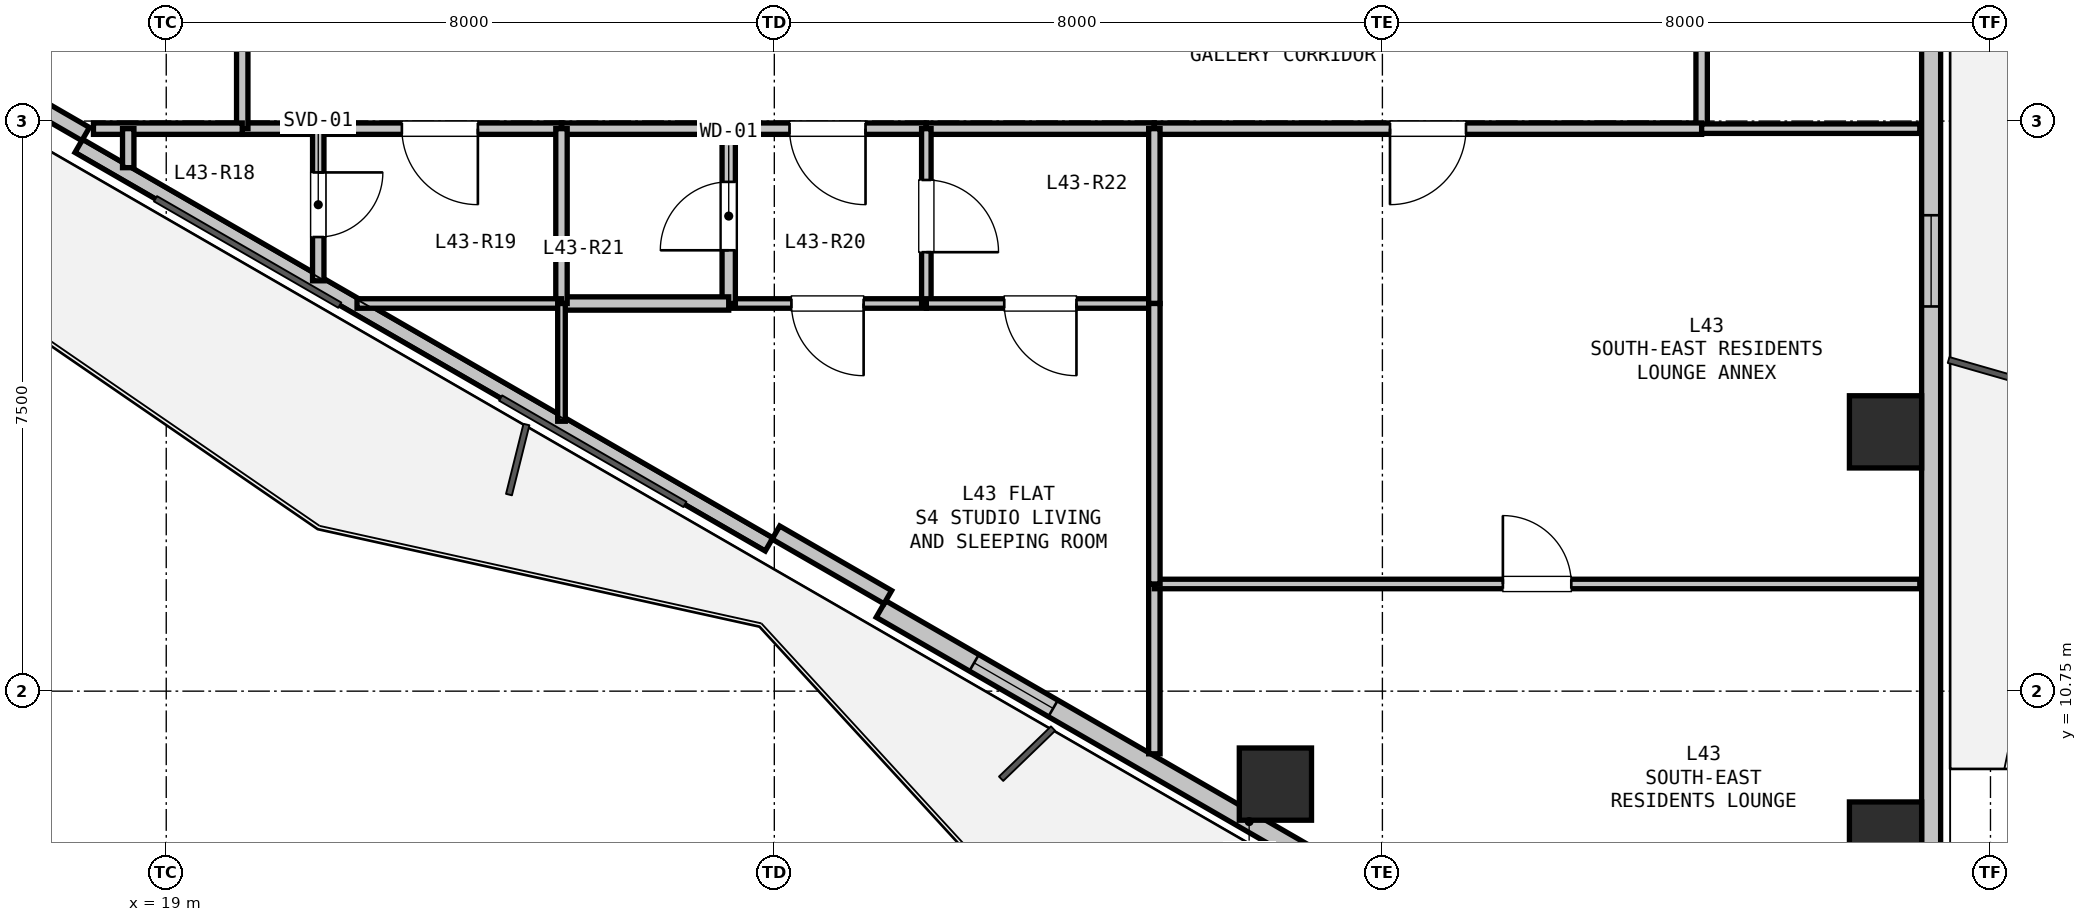
"""IFC4 building model, lengths in metres.
Left out: names, types, materials, properties, quantities, classifications, styles, units other than length and angle.
Written with IfcOpenShell. Run it as: python <this file> out.ifc"""

import sys

from ifc_helpers import new_model, si_unit, direction, frame, frame_2d, origin, origin_2d, place, context, subcontext, project, spatial, rectangle, hollow_rectangle, extrude, element, fill, save


model = new_model("IFC4")
c1 = context("Model", 3, precision=1e-05, world=origin(), true_north=direction((0.0, 1.0)))
c2 = subcontext(c1, "Body", "Model", "MODEL_VIEW")
j1 = project(units=[si_unit("LENGTHUNIT", "METRE"), si_unit("PLANEANGLEUNIT", "RADIAN")], contexts=[c1])
p1 = place(None, origin())
s1 = spatial("IfcSite", under=j1, at=p1, CompositionType="ELEMENT")
p2 = place(p1, origin())
s2 = spatial("IfcBuilding", under=s1, at=p2, CompositionType="ELEMENT")
p3 = place(p2, frame((0.0, 0.0, 154.2)))
s3 = spatial("IfcBuildingStorey", under=s2, at=p3, CompositionType="ELEMENT", Elevation=154.2)
for number, where, z_axis, x_axis in (
    (1, (41.619, 14.161, 0.0), (0.0, 0.0, 1.0), (1.0, 0.0, 0.0)),
    (2, (41.619, 8.817, 0.0), (0.0, 0.0, 1.0), (1.0, 0.0, 0.0)),
    (3, (33.593, 9.527, 0.0), (0.0, 0.0, 1.0), (1.0, 0.0, 0.0)),
):
    element("IfcColumn", number, at=place(p3, frame(where, z_axis=z_axis, x_axis=x_axis)), inside=s3, PredefinedType="COLUMN", context=c2, shape_type="SweptSolid", body=[
        extrude(hollow_rectangle(XDim=0.95, YDim=0.95, WallThickness=0.028, at=origin_2d()), origin(), (0.0, 0.0, 1.0), 3.3),
    ])
p4 = place(p3, frame((42.219, 19.807, 0.0), z_axis=(0.0, 0.0, 1.0), x_axis=(0.0, -1.0, 0.0)))
e4 = element("IfcWall", 4, at=p4, inside=s3, PredefinedType="SOLIDWALL", context=c2, shape_type="SweptSolid", body=[
    extrude(rectangle(XDim=11.186, YDim=0.25, at=frame_2d((5.593, 0.0))), origin(), (0.0, 0.0, 1.0), 2.68),
])
p5 = place(p4, frame((2.796, 0.0, 0.9)))
e5 = element("IfcOpeningElement", 5, at=p5, cuts=e4, PredefinedType="OPENING", context=c2, shape_type="SweptSolid", body=[
    extrude(rectangle(XDim=1.2, YDim=1.5, at=frame_2d((0.6, 0.75))), frame((0.0, 0.135, 0.0), z_axis=(0.0, -1.0, 0.0), x_axis=(1.0, 0.0, 0.0)), (0.0, 0.0, 1.0), 0.27),
])
p6 = place(p3, frame((38.091, 6.237, 0.0), z_axis=(0.0, 0.0, 1.0), x_axis=(-0.86602239209, 0.500005216371, 0.0)))
e6 = element("IfcWall", 6, at=p6, inside=s3, PredefinedType="SOLIDWALL", context=c2, shape_type="SweptSolid", body=[
    extrude(rectangle(XDim=11.186, YDim=0.25, at=frame_2d((5.593, 0.0))), origin(), (0.0, 0.0, 1.0), 2.68),
])
p7 = place(p6, frame((2.027, 0.0, 0.0)))
e7 = element("IfcOpeningElement", 7, at=p7, cuts=e6, PredefinedType="OPENING", context=c2, shape_type="SweptSolid", body=[
    extrude(rectangle(XDim=1.1, YDim=2.1, at=frame_2d((0.55, 1.05))), frame((0.0, 0.135, 0.0), z_axis=(0.0, -1.0, 0.0), x_axis=(1.0, 0.0, 0.0)), (0.0, 0.0, 1.0), 0.27),
])
p8 = place(p6, frame((8.571, 0.0, 0.9)))
e8 = element("IfcOpeningElement", 8, at=p8, cuts=e6, PredefinedType="OPENING", context=c2, shape_type="SweptSolid", body=[
    extrude(rectangle(XDim=1.2, YDim=1.4, at=frame_2d((0.6, 0.7))), frame((0.0, 0.135, 0.0), z_axis=(0.0, -1.0, 0.0), x_axis=(1.0, 0.0, 0.0)), (0.0, 0.0, 1.0), 0.27),
])
p9 = place(p3, frame((26.931, 12.68, 0.0), z_axis=(0.0, 0.0, 1.0), x_axis=(-0.866026619769, 0.499997893847, 0.0)))
e9 = element("IfcWall", 9, at=p9, inside=s3, PredefinedType="PARAPET", context=c2, shape_type="SweptSolid", body=[
    extrude(rectangle(XDim=10.486, YDim=0.2, at=frame_2d((5.243, 0.0))), origin(), (0.0, 0.0, 1.0), 0.2),
])
for number, where, z_axis, x_axis in (
    (10, (28.493, 11.986, 0.0), (0.0, 0.0, 1.0), (-0.866, 0.5, 0.0)),
    (11, (17.94, 18.079, 0.0), (0.0, 0.0, 1.0), (-0.866, 0.5, 0.0)),
):
    element("IfcWall", number, at=place(p3, frame(where, z_axis=z_axis, x_axis=x_axis)), inside=s3, PredefinedType="PARAPET", context=c2, shape_type="SweptSolid", body=[
        extrude(rectangle(XDim=1.7, YDim=0.2, at=frame_2d((0.85, 0.0))), origin(), (0.0, 0.0, 1.0), 2.68),
    ])
p10 = place(p3, frame((39.2, 19.9, 0.0), z_axis=(0.0, 0.0, 1.0), x_axis=(0.0, -1.0, 0.0)))
e12 = element("IfcWall", 12, at=p10, inside=s3, PredefinedType="PARTITIONING", context=c2, shape_type="SweptSolid", body=[
    extrude(rectangle(XDim=1.75, YDim=0.15, at=frame_2d((0.875, 0.0))), origin(), (0.0, 0.0, 1.0), 3.06),
])
p11 = place(p3, frame((39.2, 18.15, 0.0), z_axis=(0.0, 0.0, 1.0), x_axis=(-1.0, 0.0, 0.0)))
e13 = element("IfcWall", 13, at=p11, inside=s3, PredefinedType="PARTITIONING", context=c2, shape_type="SweptSolid", body=[
    extrude(rectangle(XDim=7.2, YDim=0.15, at=frame_2d((3.6, 0.0))), origin(), (0.0, 0.0, 1.0), 2.433),
])
p12 = place(p11, frame((3.1, 0.0, 0.0)))
e14 = element("IfcOpeningElement", 14, at=p12, cuts=e13, PredefinedType="OPENING", context=c2, shape_type="SweptSolid", body=[
    extrude(rectangle(XDim=1.0, YDim=2.15, at=frame_2d((0.5, 1.075))), frame((0.0, 0.085, 0.0), z_axis=(0.0, -1.0, 0.0), x_axis=(1.0, 0.0, 0.0)), (0.0, 0.0, 1.0), 0.17),
])
p13 = place(p3, frame((32.0, 18.15, 0.0), z_axis=(0.0, 0.0, 1.0), x_axis=(-1.0, 0.0, 0.0)))
e15 = element("IfcWall", 15, at=p13, inside=s3, PredefinedType="PARTITIONING", context=c2, shape_type="SweptSolid", body=[
    extrude(rectangle(XDim=3.0, YDim=0.15, at=frame_2d((1.5, 0.0))), origin(), (0.0, 0.0, 1.0), 3.06),
])
p14 = place(p3, frame((29.0, 18.15, 0.0), z_axis=(0.0, 0.0, 1.0), x_axis=(-1.0, 0.0, 0.0)))
e16 = element("IfcWall", 16, at=p14, inside=s3, PredefinedType="PARTITIONING", context=c2, shape_type="SweptSolid", body=[
    extrude(rectangle(XDim=2.6, YDim=0.15, at=frame_2d((1.3, 0.0))), origin(), (0.0, 0.0, 1.0), 3.06),
])
p15 = place(p14, frame((0.8, 0.0, 0.0)))
e17 = element("IfcOpeningElement", 17, at=p15, cuts=e16, PredefinedType="OPENING", context=c2, shape_type="SweptSolid", body=[
    extrude(rectangle(XDim=1.0, YDim=2.15, at=frame_2d((0.5, 1.075))), frame((0.0, 0.085, 0.0), z_axis=(0.0, -1.0, 0.0), x_axis=(1.0, 0.0, 0.0)), (0.0, 0.0, 1.0), 0.17),
])
p16 = place(p3, frame((26.4, 18.15, 0.0), z_axis=(0.0, 0.0, 1.0), x_axis=(-1.0, 0.0, 0.0)))
e18 = element("IfcWall", 18, at=p16, inside=s3, PredefinedType="PARTITIONING", context=c2, shape_type="SweptSolid", body=[
    extrude(rectangle(XDim=2.2, YDim=0.15, at=frame_2d((1.1, 0.0))), origin(), (0.0, 0.0, 1.0), 2.433),
])
p17 = place(p3, frame((24.2, 18.15, 0.0), z_axis=(0.0, 0.0, 1.0), x_axis=(-1.0, 0.0, 0.0)))
e19 = element("IfcWall", 19, at=p17, inside=s3, PredefinedType="PARTITIONING", context=c2, shape_type="SweptSolid", body=[
    extrude(rectangle(XDim=3.2, YDim=0.15, at=frame_2d((1.6, 0.0))), origin(), (0.0, 0.0, 1.0), 2.433),
])
p18 = place(p17, frame((1.1, 0.0, 0.0)))
e20 = element("IfcOpeningElement", 20, at=p18, cuts=e19, PredefinedType="OPENING", context=c2, shape_type="SweptSolid", body=[
    extrude(rectangle(XDim=1.0, YDim=2.15, at=frame_2d((0.5, 1.075))), frame((0.0, 0.085, 0.0), z_axis=(0.0, -1.0, 0.0), x_axis=(1.0, 0.0, 0.0)), (0.0, 0.0, 1.0), 0.17),
])
p19 = place(p3, frame((21.0, 18.15, 0.0), z_axis=(0.0, 0.0, 1.0), x_axis=(-1.0, 0.0, 0.0)))
e21 = element("IfcWall", 21, at=p19, inside=s3, PredefinedType="PARTITIONING", context=c2, shape_type="SweptSolid", body=[
    extrude(rectangle(XDim=1.0, YDim=0.15, at=frame_2d((0.5, 0.0))), origin(), (0.0, 0.0, 1.0), 3.06),
])
p20 = place(p3, frame((20.0, 18.15, 0.0), z_axis=(0.0, 0.0, 1.0), x_axis=(0.0, 1.0, 0.0)))
e22 = element("IfcWall", 22, at=p20, inside=s3, PredefinedType="PARTITIONING", context=c2, shape_type="SweptSolid", body=[
    extrude(rectangle(XDim=1.75, YDim=0.15, at=frame_2d((0.875, 0.0))), origin(), (0.0, 0.0, 1.0), 3.06),
])
p21 = place(p3, frame((29.0, 15.85, 0.0), z_axis=(0.0, 0.0, 1.0), x_axis=(-1.0, 0.0, 0.0)))
e23 = element("IfcWall", 23, at=p21, inside=s3, PredefinedType="PARTITIONING", context=c2, shape_type="SweptSolid", body=[
    extrude(rectangle(XDim=2.6, YDim=0.125, at=frame_2d((1.3, 0.0))), origin(), (0.0, 0.0, 1.0), 2.433),
])
p22 = place(p21, frame((0.825, 0.0, 0.0)))
e24 = element("IfcOpeningElement", 24, at=p22, cuts=e23, PredefinedType="OPENING", context=c2, shape_type="SweptSolid", body=[
    extrude(rectangle(XDim=0.95, YDim=2.1, at=frame_2d((0.475, 1.05))), frame((0.0, 0.073, 0.0), z_axis=(0.0, -1.0, 0.0), x_axis=(1.0, 0.0, 0.0)), (0.0, 0.0, 1.0), 0.145),
])
p23 = place(p3, frame((26.4, 15.85, 0.0), z_axis=(0.0, 0.0, 1.0), x_axis=(0.0, 1.0, 0.0)))
e25 = element("IfcWall", 25, at=p23, inside=s3, PredefinedType="PLUMBINGWALL", context=c2, shape_type="SweptSolid", body=[
    extrude(rectangle(XDim=2.3, YDim=0.175, at=frame_2d((1.15, 0.0))), origin(), (0.0, 0.0, 1.0), 2.433),
])
p24 = place(p23, frame((0.7, 0.0, 0.0)))
e26 = element("IfcOpeningElement", 26, at=p24, cuts=e25, PredefinedType="OPENING", context=c2, shape_type="SweptSolid", body=[
    extrude(rectangle(XDim=0.9, YDim=2.1, at=frame_2d((0.45, 1.05))), frame((0.0, 0.097, 0.0), z_axis=(0.0, -1.0, 0.0), x_axis=(1.0, 0.0, 0.0)), (0.0, 0.0, 1.0), 0.195),
])
p25 = place(p3, frame((29.0, 18.15, 0.0), z_axis=(0.0, 0.0, 1.0), x_axis=(0.0, -1.0, 0.0)))
e27 = element("IfcWall", 27, at=p25, inside=s3, PredefinedType="PARTITIONING", context=c2, shape_type="SweptSolid", body=[
    extrude(rectangle(XDim=2.3, YDim=0.125, at=frame_2d((1.15, 0.0))), origin(), (0.0, 0.0, 1.0), 3.06),
])
p26 = place(p25, frame((0.675, 0.0, 0.0)))
e28 = element("IfcOpeningElement", 28, at=p26, cuts=e27, PredefinedType="OPENING", context=c2, shape_type="SweptSolid", body=[
    extrude(rectangle(XDim=0.95, YDim=2.1, at=frame_2d((0.475, 1.05))), frame((0.0, 0.073, 0.0), z_axis=(0.0, -1.0, 0.0), x_axis=(1.0, 0.0, 0.0)), (0.0, 0.0, 1.0), 0.145),
])
p27 = place(p3, frame((26.4, 15.85, 0.0), z_axis=(0.0, 0.0, 1.0), x_axis=(-1.0, 0.0, 0.0)))
e29 = element("IfcWall", 29, at=p27, inside=s3, PredefinedType="PLUMBINGWALL", context=c2, shape_type="SweptSolid", body=[
    extrude(rectangle(XDim=2.2, YDim=0.175, at=frame_2d((1.1, 0.0))), origin(), (0.0, 0.0, 1.0), 3.06),
])
p28 = place(p3, frame((24.2, 15.85, 0.0), z_axis=(0.0, 0.0, 1.0), x_axis=(0.0, 1.0, 0.0)))
e30 = element("IfcWall", 30, at=p28, inside=s3, PredefinedType="PARTITIONING", context=c2, shape_type="SweptSolid", body=[
    extrude(rectangle(XDim=2.3, YDim=0.15, at=frame_2d((1.15, 0.0))), origin(), (0.0, 0.0, 1.0), 2.433),
])
p29 = place(p3, frame((32.0, 15.85, 0.0), z_axis=(0.0, 0.0, 1.0), x_axis=(-1.0, 0.0, 0.0)))
e31 = element("IfcWall", 31, at=p29, inside=s3, PredefinedType="PARTITIONING", context=c2, shape_type="SweptSolid", body=[
    extrude(rectangle(XDim=3.0, YDim=0.125, at=frame_2d((1.5, 0.0))), origin(), (0.0, 0.0, 1.0), 3.06),
])
p30 = place(p29, frame((1.025, 0.0, 0.0)))
e32 = element("IfcOpeningElement", 32, at=p30, cuts=e31, PredefinedType="OPENING", context=c2, shape_type="SweptSolid", body=[
    extrude(rectangle(XDim=0.95, YDim=2.1, at=frame_2d((0.475, 1.05))), frame((0.0, 0.073, 0.0), z_axis=(0.0, -1.0, 0.0), x_axis=(1.0, 0.0, 0.0)), (0.0, 0.0, 1.0), 0.145),
])
p31 = place(p3, frame((32.0, 18.15, 0.0), z_axis=(0.0, 0.0, 1.0), x_axis=(0.0, -1.0, 0.0)))
e33 = element("IfcWall", 33, at=p31, inside=s3, PredefinedType="PARTITIONING", context=c2, shape_type="SweptSolid", body=[
    extrude(rectangle(XDim=2.3, YDim=0.15, at=frame_2d((1.15, 0.0))), origin(), (0.0, 0.0, 1.0), 3.06),
])
p32 = place(p3, frame((32.0, 9.926, 0.0), z_axis=(0.0, 0.0, 1.0), x_axis=(0.0, 1.0, 0.0)))
e34 = element("IfcWall", 34, at=p32, inside=s3, PredefinedType="PARTITIONING", context=c2, shape_type="SweptSolid", body=[
    extrude(rectangle(XDim=2.234, YDim=0.15, at=frame_2d((1.117, 0.0))), origin(), (0.0, 0.0, 1.0), 2.365),
])
p33 = place(p3, frame((32.0, 12.16, 0.0), z_axis=(0.0, 0.0, 1.0), x_axis=(1.0, 0.0, 0.0)))
e35 = element("IfcWall", 35, at=p33, inside=s3, PredefinedType="PARTITIONING", context=c2, shape_type="SweptSolid", body=[
    extrude(rectangle(XDim=10.07, YDim=0.125, at=frame_2d((5.035, 0.0))), origin(), (0.0, 0.0, 1.0), 2.433),
])
p34 = place(p33, frame((4.585, 0.0, 0.0)))
e36 = element("IfcOpeningElement", 36, at=p34, cuts=e35, PredefinedType="OPENING", context=c2, shape_type="SweptSolid", body=[
    extrude(rectangle(XDim=0.9, YDim=2.1, at=frame_2d((0.45, 1.05))), frame((0.0, 0.073, 0.0), z_axis=(0.0, -1.0, 0.0), x_axis=(1.0, 0.0, 0.0)), (0.0, 0.0, 1.0), 0.145),
])
p35 = place(p3, frame((39.2, 18.15, 0.0), z_axis=(0.0, 0.0, 1.0), x_axis=(1.0, 0.0, 0.0)))
e37 = element("IfcWall", 37, at=p35, inside=s3, PredefinedType="PARTITIONING", context=c2, shape_type="SweptSolid", body=[
    extrude(rectangle(XDim=2.87, YDim=0.125, at=frame_2d((1.435, 0.0))), origin(), (0.0, 0.0, 1.0), 2.365),
])
p36 = place(p3, frame((32.0, 12.16, 0.0), z_axis=(0.0, 0.0, 1.0), x_axis=(0.0, 1.0, 0.0)))
e38 = element("IfcWall", 38, at=p36, inside=s3, PredefinedType="PARTITIONING", context=c2, shape_type="SweptSolid", body=[
    extrude(rectangle(XDim=3.69, YDim=0.15, at=frame_2d((1.845, 0.0))), origin(), (0.0, 0.0, 1.0), 3.06),
])
p37 = place(p3, frame((18.042, 18.15, 0.0), z_axis=(0.0, 0.0, 1.0), x_axis=(1.0, 0.0, 0.0)))
e39 = element("IfcWall", 39, at=p37, inside=s3, PredefinedType="PARTITIONING", context=c2, shape_type="SweptSolid", body=[
    extrude(rectangle(XDim=1.958, YDim=0.15, at=frame_2d((0.979, 0.0))), origin(), (0.0, 0.0, 1.0), 2.365),
])
p38 = place(p3, frame((21.0, 18.15, 0.0), z_axis=(0.0, 0.0, 1.0), x_axis=(0.0, -1.0, 0.0)))
e40 = element("IfcWall", 40, at=p38, inside=s3, PredefinedType="PARTITIONING", context=c2, shape_type="SweptSolid", body=[
    extrude(rectangle(XDim=2.001, YDim=0.15, at=frame_2d((1.001, 0.0))), origin(), (0.0, 0.0, 1.0), 2.365),
])
p39 = place(p38, frame((0.576, 0.0, 0.0)))
e41 = element("IfcOpeningElement", 41, at=p39, cuts=e40, PredefinedType="OPENING", context=c2, shape_type="SweptSolid", body=[
    extrude(rectangle(XDim=0.85, YDim=2.1, at=frame_2d((0.425, 1.05))), frame((0.0, 0.085, 0.0), z_axis=(0.0, -1.0, 0.0), x_axis=(1.0, 0.0, 0.0)), (0.0, 0.0, 1.0), 0.17),
])
p40 = place(p3, frame((18.5, 17.637, 0.0), z_axis=(0.0, 0.0, 1.0), x_axis=(0.0, 1.0, 0.0)))
e42 = element("IfcWall", 42, at=p40, inside=s3, PredefinedType="PARTITIONING", context=c2, shape_type="SweptSolid", body=[
    extrude(rectangle(XDim=0.513, YDim=0.15, at=frame_2d((0.257, 0.0))), origin(), (0.0, 0.0, 1.0), 2.365),
])
p41 = place(p3, frame((24.2, 15.85, 0.0), z_axis=(0.0, 0.0, 1.0), x_axis=(-1.0, 0.0, 0.0)))
e43 = element("IfcWall", 43, at=p41, inside=s3, PredefinedType="PARTITIONING", context=c2, shape_type="SweptSolid", body=[
    extrude(rectangle(XDim=2.69, YDim=0.125, at=frame_2d((1.345, 0.0))), origin(), (0.0, 0.0, 1.0), 2.365),
])
p42 = place(p3, frame((24.2, 14.301, 0.0), z_axis=(0.0, 0.0, 1.0), x_axis=(0.0, 1.0, 0.0)))
e44 = element("IfcWall", 44, at=p42, inside=s3, PredefinedType="PARTITIONING", context=c2, shape_type="SweptSolid", body=[
    extrude(rectangle(XDim=1.549, YDim=0.1, at=frame_2d((0.774, 0.0))), origin(), (0.0, 0.0, 1.0), 2.365),
])
p43 = place(p5, origin())
e45 = element("IfcWindow", 45, at=p43, inside=s3, PartitioningType="SINGLE_PANEL", PredefinedType="WINDOW", context=c2, shape_type="SweptSolid", body=[
    extrude(rectangle(XDim=1.2, YDim=1.5, at=frame_2d((0.6, 0.75))), frame((0.0, 0.03, 0.0), z_axis=(0.0, -1.0, 0.0), x_axis=(1.0, 0.0, 0.0)), (0.0, 0.0, 1.0), 0.06),
])
fill(e5, e45)
p44 = place(p8, origin())
e46 = element("IfcWindow", 46, at=p44, inside=s3, PartitioningType="SINGLE_PANEL", PredefinedType="WINDOW", context=c2, shape_type="SweptSolid", body=[
    extrude(rectangle(XDim=1.2, YDim=1.4, at=frame_2d((0.6, 0.7))), frame((0.0, 0.03, 0.0), z_axis=(0.0, -1.0, 0.0), x_axis=(1.0, 0.0, 0.0)), (0.0, 0.0, 1.0), 0.06),
])
fill(e8, e46)
p45 = place(p15, origin())
e47 = element("IfcDoor", 47, at=p45, inside=s3, OperationType="SINGLE_SWING_LEFT", PredefinedType="DOOR", context=c2, shape_type="SweptSolid", body=[
    extrude(rectangle(XDim=1.0, YDim=2.15, at=frame_2d((0.5, 1.075))), frame((0.0, 0.025, 0.0), z_axis=(0.0, -1.0, 0.0), x_axis=(1.0, 0.0, 0.0)), (0.0, 0.0, 1.0), 0.05),
])
fill(e17, e47)
p46 = place(p12, origin())
e48 = element("IfcDoor", 48, at=p46, inside=s3, OperationType="SINGLE_SWING_RIGHT", PredefinedType="DOOR", context=c2, shape_type="SweptSolid", body=[
    extrude(rectangle(XDim=1.0, YDim=2.15, at=frame_2d((0.5, 1.075))), frame((0.0, 0.025, 0.0), z_axis=(0.0, -1.0, 0.0), x_axis=(1.0, 0.0, 0.0)), (0.0, 0.0, 1.0), 0.05),
])
fill(e14, e48)
p47 = place(p18, origin())
e49 = element("IfcDoor", 49, at=p47, inside=s3, OperationType="SINGLE_SWING_LEFT", PredefinedType="DOOR", context=c2, shape_type="SweptSolid", body=[
    extrude(rectangle(XDim=1.0, YDim=2.15, at=frame_2d((0.5, 1.075))), frame((0.0, 0.025, 0.0), z_axis=(0.0, -1.0, 0.0), x_axis=(1.0, 0.0, 0.0)), (0.0, 0.0, 1.0), 0.05),
])
fill(e20, e49)
p48 = place(p24, origin())
e50 = element("IfcDoor", 50, at=p48, inside=s3, OperationType="SINGLE_SWING_LEFT", PredefinedType="DOOR", context=c2, shape_type="SweptSolid", body=[
    extrude(rectangle(XDim=0.9, YDim=2.1, at=frame_2d((0.45, 1.05))), frame((0.0, 0.025, 0.0), z_axis=(0.0, -1.0, 0.0), x_axis=(1.0, 0.0, 0.0)), (0.0, 0.0, 1.0), 0.05),
])
fill(e26, e50)
p49 = place(p26, origin())
e51 = element("IfcDoor", 51, at=p49, inside=s3, OperationType="SINGLE_SWING_RIGHT", PredefinedType="DOOR", context=c2, shape_type="SweptSolid", body=[
    extrude(rectangle(XDim=0.95, YDim=2.1, at=frame_2d((0.475, 1.05))), frame((0.0, 0.025, 0.0), z_axis=(0.0, -1.0, 0.0), x_axis=(1.0, 0.0, 0.0)), (0.0, 0.0, 1.0), 0.05),
])
fill(e28, e51)
p50 = place(p22, origin())
e52 = element("IfcDoor", 52, at=p50, inside=s3, OperationType="SINGLE_SWING_LEFT", PredefinedType="DOOR", context=c2, shape_type="SweptSolid", body=[
    extrude(rectangle(XDim=0.95, YDim=2.1, at=frame_2d((0.475, 1.05))), frame((0.0, 0.025, 0.0), z_axis=(0.0, -1.0, 0.0), x_axis=(1.0, 0.0, 0.0)), (0.0, 0.0, 1.0), 0.05),
])
fill(e24, e52)
p51 = place(p30, origin())
e53 = element("IfcDoor", 53, at=p51, inside=s3, OperationType="SINGLE_SWING_LEFT", PredefinedType="DOOR", context=c2, shape_type="SweptSolid", body=[
    extrude(rectangle(XDim=0.95, YDim=2.1, at=frame_2d((0.475, 1.05))), frame((0.0, 0.025, 0.0), z_axis=(0.0, -1.0, 0.0), x_axis=(1.0, 0.0, 0.0)), (0.0, 0.0, 1.0), 0.05),
])
fill(e32, e53)
p52 = place(p34, origin())
e54 = element("IfcDoor", 54, at=p52, inside=s3, OperationType="SINGLE_SWING_LEFT", PredefinedType="DOOR", context=c2, shape_type="SweptSolid", body=[
    extrude(rectangle(XDim=0.9, YDim=2.1, at=frame_2d((0.45, 1.05))), frame((0.0, 0.025, 0.0), z_axis=(0.0, -1.0, 0.0), x_axis=(1.0, 0.0, 0.0)), (0.0, 0.0, 1.0), 0.05),
])
fill(e36, e54)
p53 = place(p39, origin())
e55 = element("IfcDoor", 55, at=p53, inside=s3, OperationType="SINGLE_SWING_LEFT", PredefinedType="DOOR", context=c2, shape_type="SweptSolid", body=[
    extrude(rectangle(XDim=0.85, YDim=2.1, at=frame_2d((0.425, 1.05))), frame((0.0, 0.025, 0.0), z_axis=(0.0, -1.0, 0.0), x_axis=(1.0, 0.0, 0.0)), (0.0, 0.0, 1.0), 0.05),
])
fill(e41, e55)
save(model, sys.argv[1])
